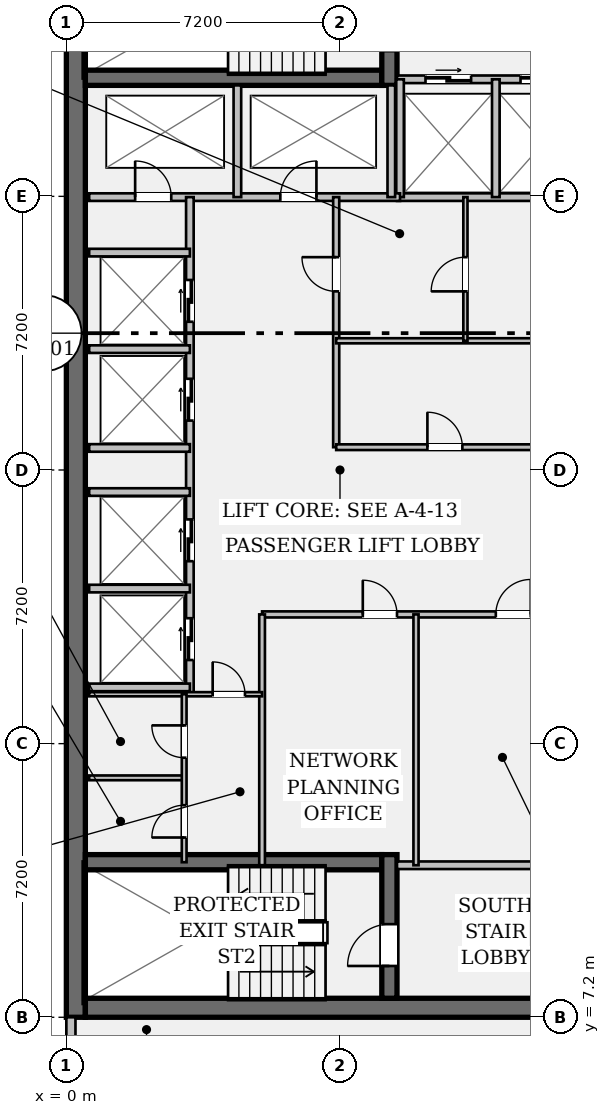
"""IFC4 building model, lengths in metres.
Left out: names, types, materials, properties, quantities, classifications, styles, units other than length and angle.
Written with IfcOpenShell. Run it as: python <this file> out.ifc"""

import sys

from ifc_helpers import new_model, si_unit, direction, frame, frame_2d, origin, place, context, subcontext, project, spatial, rectangle, extrude, element, fill, save


model = new_model("IFC4")
c1 = context("Model", 3, precision=1e-05, world=origin(), true_north=direction((0.0, 1.0)))
c2 = subcontext(c1, "Body", "Model", "MODEL_VIEW")
j1 = project(units=[si_unit("LENGTHUNIT", "METRE"), si_unit("PLANEANGLEUNIT", "RADIAN")], contexts=[c1])
p1 = place(None, origin())
s1 = spatial("IfcSite", under=j1, at=p1, CompositionType="ELEMENT")
p2 = place(p1, origin())
s2 = spatial("IfcBuilding", under=s1, at=p2, CompositionType="ELEMENT")
p3 = place(p2, frame((0.0, 0.0, 258.65)))
s3 = spatial("IfcBuildingStorey", under=s2, at=p3, CompositionType="ELEMENT", Elevation=258.65)
p4 = place(p3, frame((0.25, 7.2, 0.0), z_axis=(0.0, 0.0, 1.0), x_axis=(0.0, 1.0, 0.0)))
e1 = element("IfcWall", 1, at=p4, inside=s3, PredefinedType="SHEAR", context=c2, shape_type="SweptSolid", body=[
    extrude(rectangle(XDim=28.8, YDim=0.5, at=frame_2d((14.4, 0.0))), origin(), (0.0, 0.0, 1.0), 3.24),
])
p5 = place(p3, frame((0.5, 7.45, 0.0), z_axis=(0.0, 0.0, 1.0), x_axis=(1.0, 0.0, 0.0)))
e2 = element("IfcWall", 2, at=p5, inside=s3, PredefinedType="SHEAR", context=c2, shape_type="SweptSolid", body=[
    extrude(rectangle(XDim=13.9, YDim=0.5, at=frame_2d((6.95, 0.0))), origin(), (0.0, 0.0, 1.0), 3.24),
])
for number, where, z_axis, x_axis in (
    (3, (0.5, 31.92, 0.0), (0.0, 0.0, 1.0), (1.0, 0.0, 0.0)),
    (4, (0.5, 11.28, 0.0), (0.0, 0.0, 1.0), (1.0, 0.0, 0.0)),
):
    element("IfcWall", number, at=place(p3, frame(where, z_axis=z_axis, x_axis=x_axis)), inside=s3, PredefinedType="SHEAR", context=c2, shape_type="SweptSolid", body=[
        extrude(rectangle(XDim=7.8, YDim=0.4, at=frame_2d((3.9, 0.0))), origin(), (0.0, 0.0, 1.0), 3.24),
    ])
p6 = place(p3, frame((8.5, 31.72, 0.0), z_axis=(0.0, 0.0, 1.0), x_axis=(0.0, 1.0, 0.0)))
e5 = element("IfcWall", 5, at=p6, inside=s3, PredefinedType="SHEAR", context=c2, shape_type="SweptSolid", body=[
    extrude(rectangle(XDim=3.78, YDim=0.4, at=frame_2d((1.89, 0.0))), origin(), (0.0, 0.0, 1.0), 3.24),
])
p7 = place(p6, frame((0.9, 0.0, 0.0)))
e6 = element("IfcOpeningElement", 6, at=p7, cuts=e5, PredefinedType="OPENING", context=c2, shape_type="SweptSolid", body=[
    extrude(rectangle(XDim=1.1, YDim=2.15, at=frame_2d((0.55, 1.075))), frame((0.0, 0.212, 0.0), z_axis=(0.0, -1.0, 0.0), x_axis=(1.0, 0.0, 0.0)), (0.0, 0.0, 1.0), 0.424),
])
p8 = place(p3, frame((8.5, 7.7, 0.0), z_axis=(0.0, 0.0, 1.0), x_axis=(0.0, 1.0, 0.0)))
e7 = element("IfcWall", 7, at=p8, inside=s3, PredefinedType="SHEAR", context=c2, shape_type="SweptSolid", body=[
    extrude(rectangle(XDim=3.78, YDim=0.4, at=frame_2d((1.89, 0.0))), origin(), (0.0, 0.0, 1.0), 3.24),
])
p9 = place(p8, frame((0.85, 0.0, 0.0)))
e8 = element("IfcOpeningElement", 8, at=p9, cuts=e7, PredefinedType="OPENING", context=c2, shape_type="SweptSolid", body=[
    extrude(rectangle(XDim=1.1, YDim=2.15, at=frame_2d((0.55, 1.075))), frame((0.0, 0.212, 0.0), z_axis=(0.0, -1.0, 0.0), x_axis=(1.0, 0.0, 0.0)), (0.0, 0.0, 1.0), 0.424),
])
p10 = place(p3, frame((0.12, 6.52, 0.0), z_axis=(0.0, 0.0, 1.0), x_axis=(0.0, 1.0, 0.0)))
e9 = element("IfcWall", 9, at=p10, inside=s3, PredefinedType="STANDARD", context=c2, shape_type="SweptSolid", body=[
    extrude(rectangle(XDim=0.68, YDim=0.24, at=frame_2d((0.34, 0.0))), origin(), (0.0, 0.0, 1.0), 3.24),
])
p11 = place(p3, frame((8.7, 31.88, 0.0), z_axis=(0.0, 0.0, 1.0), x_axis=(1.0, 0.0, 0.0)))
e10 = element("IfcWall", 10, at=p11, inside=s3, PredefinedType="PARTITIONING", context=c2, shape_type="SweptSolid", body=[
    extrude(rectangle(XDim=5.15, YDim=0.2, at=frame_2d((2.575, 0.0))), origin(), (0.0, 0.0, 1.0), 3.24),
])
p12 = place(p11, frame((0.75, 0.0, 0.0)))
e11 = element("IfcOpeningElement", 11, at=p12, cuts=e10, PredefinedType="OPENING", context=c2, shape_type="SweptSolid", body=[
    extrude(rectangle(XDim=1.2, YDim=2.2, at=frame_2d((0.6, 1.1))), frame((0.0, 0.112, 0.0), z_axis=(0.0, -1.0, 0.0), x_axis=(1.0, 0.0, 0.0)), (0.0, 0.0, 1.0), 0.224),
])
p13 = place(p11, frame((3.25, 0.0, 0.0)))
e12 = element("IfcOpeningElement", 12, at=p13, cuts=e10, PredefinedType="OPENING", context=c2, shape_type="SweptSolid", body=[
    extrude(rectangle(XDim=1.2, YDim=2.2, at=frame_2d((0.6, 1.1))), frame((0.0, 0.112, 0.0), z_axis=(0.0, -1.0, 0.0), x_axis=(1.0, 0.0, 0.0)), (0.0, 0.0, 1.0), 0.224),
])
for number, where, z_axis, x_axis in (
    (13, (8.7, 11.2, 0.0), (0.0, 0.0, 1.0), (1.0, 0.0, 0.0)),
    (14, (8.7, 28.78, 0.0), (0.0, 0.0, 1.0), (1.0, 0.0, 0.0)),
):
    element("IfcWall", number, at=place(p3, frame(where, z_axis=z_axis, x_axis=x_axis)), inside=s3, PredefinedType="PARTITIONING", context=c2, shape_type="SweptSolid", body=[
        extrude(rectangle(XDim=5.15, YDim=0.2, at=frame_2d((2.575, 0.0))), origin(), (0.0, 0.0, 1.0), 3.24),
    ])
for number, where, z_axis, x_axis in (
    (15, (8.78, 28.78, 0.0), (0.0, 0.0, 1.0), (0.0, 1.0, 0.0)),
    (16, (11.3, 28.78, 0.0), (0.0, 0.0, 1.0), (0.0, 1.0, 0.0)),
):
    element("IfcWall", number, at=place(p3, frame(where, z_axis=z_axis, x_axis=x_axis)), inside=s3, PredefinedType="PARTITIONING", context=c2, shape_type="SweptSolid", body=[
        extrude(rectangle(XDim=3.1, YDim=0.2, at=frame_2d((1.55, 0.0))), origin(), (0.0, 0.0, 1.0), 3.24),
    ])
p14 = place(p3, frame((0.6, 28.78, 0.0), z_axis=(0.0, 0.0, 1.0), x_axis=(1.0, 0.0, 0.0)))
e17 = element("IfcWall", 17, at=p14, inside=s3, PredefinedType="PARTITIONING", context=c2, shape_type="SweptSolid", body=[
    extrude(rectangle(XDim=8.18, YDim=0.2, at=frame_2d((4.09, 0.0))), origin(), (0.0, 0.0, 1.0), 3.24),
])
p15 = place(p14, frame((1.21, 0.0, 0.0)))
e18 = element("IfcOpeningElement", 18, at=p15, cuts=e17, PredefinedType="OPENING", context=c2, shape_type="SweptSolid", body=[
    extrude(rectangle(XDim=0.95, YDim=2.15, at=frame_2d((0.475, 1.075))), frame((0.0, 0.112, 0.0), z_axis=(0.0, -1.0, 0.0), x_axis=(1.0, 0.0, 0.0)), (0.0, 0.0, 1.0), 0.224),
])
p16 = place(p14, frame((5.03, 0.0, 0.0)))
e19 = element("IfcOpeningElement", 19, at=p16, cuts=e17, PredefinedType="OPENING", context=c2, shape_type="SweptSolid", body=[
    extrude(rectangle(XDim=0.95, YDim=2.15, at=frame_2d((0.475, 1.075))), frame((0.0, 0.112, 0.0), z_axis=(0.0, -1.0, 0.0), x_axis=(1.0, 0.0, 0.0)), (0.0, 0.0, 1.0), 0.224),
])
for number, where, z_axis, x_axis in (
    (20, (4.5, 28.78, 0.0), (0.0, 0.0, 1.0), (0.0, 1.0, 0.0)),
    (21, (8.55, 28.78, 0.0), (0.0, 0.0, 1.0), (0.0, 1.0, 0.0)),
):
    element("IfcWall", number, at=place(p3, frame(where, z_axis=z_axis, x_axis=x_axis)), inside=s3, PredefinedType="PARTITIONING", context=c2, shape_type="SweptSolid", body=[
        extrude(rectangle(XDim=2.94, YDim=0.2, at=frame_2d((1.47, 0.0))), origin(), (0.0, 0.0, 1.0), 3.24),
    ])
p17 = place(p3, frame((3.25, 15.7, 0.0), z_axis=(0.0, 0.0, 1.0), x_axis=(0.0, 1.0, 0.0)))
e22 = element("IfcWall", 22, at=p17, inside=s3, PredefinedType="PARTITIONING", context=c2, shape_type="SweptSolid", body=[
    extrude(rectangle(XDim=13.08, YDim=0.2, at=frame_2d((6.54, 0.0))), origin(), (0.0, 0.0, 1.0), 3.24),
])
p18 = place(p17, frame((0.9, 0.0, 0.0)))
e23 = element("IfcOpeningElement", 23, at=p18, cuts=e22, PredefinedType="OPENING", context=c2, shape_type="SweptSolid", body=[
    extrude(rectangle(XDim=1.1, YDim=2.2, at=frame_2d((0.55, 1.1))), frame((0.0, 0.112, 0.0), z_axis=(0.0, -1.0, 0.0), x_axis=(1.0, 0.0, 0.0)), (0.0, 0.0, 1.0), 0.224),
])
p19 = place(p17, frame((3.5, 0.0, 0.0)))
e24 = element("IfcOpeningElement", 24, at=p19, cuts=e22, PredefinedType="OPENING", context=c2, shape_type="SweptSolid", body=[
    extrude(rectangle(XDim=1.1, YDim=2.2, at=frame_2d((0.55, 1.1))), frame((0.0, 0.112, 0.0), z_axis=(0.0, -1.0, 0.0), x_axis=(1.0, 0.0, 0.0)), (0.0, 0.0, 1.0), 0.224),
])
p20 = place(p17, frame((7.2, 0.0, 0.0)))
e25 = element("IfcOpeningElement", 25, at=p20, cuts=e22, PredefinedType="OPENING", context=c2, shape_type="SweptSolid", body=[
    extrude(rectangle(XDim=1.1, YDim=2.2, at=frame_2d((0.55, 1.1))), frame((0.0, 0.112, 0.0), z_axis=(0.0, -1.0, 0.0), x_axis=(1.0, 0.0, 0.0)), (0.0, 0.0, 1.0), 0.224),
])
p21 = place(p17, frame((9.8, 0.0, 0.0)))
e26 = element("IfcOpeningElement", 26, at=p21, cuts=e22, PredefinedType="OPENING", context=c2, shape_type="SweptSolid", body=[
    extrude(rectangle(XDim=1.1, YDim=2.2, at=frame_2d((0.55, 1.1))), frame((0.0, 0.112, 0.0), z_axis=(0.0, -1.0, 0.0), x_axis=(1.0, 0.0, 0.0)), (0.0, 0.0, 1.0), 0.224),
])
for number, where, z_axis, x_axis in (
    (27, (0.6, 15.88, 0.0), (0.0, 0.0, 1.0), (1.0, 0.0, 0.0)),
    (28, (0.6, 18.48, 0.0), (0.0, 0.0, 1.0), (1.0, 0.0, 0.0)),
    (29, (0.6, 22.18, 0.0), (0.0, 0.0, 1.0), (1.0, 0.0, 0.0)),
    (30, (0.6, 24.78, 0.0), (0.0, 0.0, 1.0), (1.0, 0.0, 0.0)),
    (31, (0.6, 21.02, 0.0), (0.0, 0.0, 1.0), (1.0, 0.0, 0.0)),
    (32, (0.6, 27.32, 0.0), (0.0, 0.0, 1.0), (1.0, 0.0, 0.0)),
):
    element("IfcWall", number, at=place(p3, frame(where, z_axis=z_axis, x_axis=x_axis)), inside=s3, PredefinedType="PARTITIONING", context=c2, shape_type="SweptSolid", body=[
        extrude(rectangle(XDim=2.65, YDim=0.2, at=frame_2d((1.325, 0.0))), origin(), (0.0, 0.0, 1.0), 3.24),
    ])
p22 = place(p3, frame((7.1, 22.2, 0.0), z_axis=(0.0, 0.0, 1.0), x_axis=(0.0, 1.0, 0.0)))
e33 = element("IfcWall", 33, at=p22, inside=s3, PredefinedType="PARTITIONING", context=c2, shape_type="SweptSolid", body=[
    extrude(rectangle(XDim=6.58, YDim=0.16, at=frame_2d((3.29, 0.0))), origin(), (0.0, 0.0, 1.0), 3.24),
])
p23 = place(p22, frame((4.1, 0.0, 0.0)))
e34 = element("IfcOpeningElement", 34, at=p23, cuts=e33, PredefinedType="OPENING", context=c2, shape_type="SweptSolid", body=[
    extrude(rectangle(XDim=0.9, YDim=2.15, at=frame_2d((0.45, 1.075))), frame((0.0, 0.092, 0.0), z_axis=(0.0, -1.0, 0.0), x_axis=(1.0, 0.0, 0.0)), (0.0, 0.0, 1.0), 0.184),
])
p24 = place(p3, frame((7.1, 22.2, 0.0), z_axis=(0.0, 0.0, 1.0), x_axis=(1.0, 0.0, 0.0)))
e35 = element("IfcWall", 35, at=p24, inside=s3, PredefinedType="PARTITIONING", context=c2, shape_type="SweptSolid", body=[
    extrude(rectangle(XDim=7.05, YDim=0.15, at=frame_2d((3.525, 0.0))), origin(), (0.0, 0.0, 1.0), 3.24),
])
p25 = place(p24, frame((2.4, 0.0, 0.0)))
e36 = element("IfcOpeningElement", 36, at=p25, cuts=e35, PredefinedType="OPENING", context=c2, shape_type="SweptSolid", body=[
    extrude(rectangle(XDim=0.92, YDim=2.15, at=frame_2d((0.46, 1.075))), frame((0.0, 0.087, 0.0), z_axis=(0.0, -1.0, 0.0), x_axis=(1.0, 0.0, 0.0)), (0.0, 0.0, 1.0), 0.174),
])
p26 = place(p3, frame((7.1, 25.0, 0.0), z_axis=(0.0, 0.0, 1.0), x_axis=(1.0, 0.0, 0.0)))
e37 = element("IfcWall", 37, at=p26, inside=s3, PredefinedType="PARTITIONING", context=c2, shape_type="SweptSolid", body=[
    extrude(rectangle(XDim=7.05, YDim=0.135, at=frame_2d((3.525, 0.0))), origin(), (0.0, 0.0, 1.0), 3.24),
])
p27 = place(p3, frame((10.5, 25.0, 0.0), z_axis=(0.0, 0.0, 1.0), x_axis=(0.0, 1.0, 0.0)))
e38 = element("IfcWall", 38, at=p27, inside=s3, PredefinedType="PARTITIONING", context=c2, shape_type="SweptSolid", body=[
    extrude(rectangle(XDim=3.78, YDim=0.11, at=frame_2d((1.89, 0.0))), origin(), (0.0, 0.0, 1.0), 3.24),
])
p28 = place(p27, frame((1.3, 0.0, 0.0)))
e39 = element("IfcOpeningElement", 39, at=p28, cuts=e38, PredefinedType="OPENING", context=c2, shape_type="SweptSolid", body=[
    extrude(rectangle(XDim=0.9, YDim=2.15, at=frame_2d((0.45, 1.075))), frame((0.0, 0.067, 0.0), z_axis=(0.0, -1.0, 0.0), x_axis=(1.0, 0.0, 0.0)), (0.0, 0.0, 1.0), 0.134),
])
p29 = place(p3, frame((5.15, 17.8, 0.0), z_axis=(0.0, 0.0, 1.0), x_axis=(1.0, 0.0, 0.0)))
e40 = element("IfcWall", 40, at=p29, inside=s3, PredefinedType="PARTITIONING", context=c2, shape_type="SweptSolid", body=[
    extrude(rectangle(XDim=9.0, YDim=0.16, at=frame_2d((4.5, 0.0))), origin(), (0.0, 0.0, 1.0), 3.24),
])
p30 = place(p29, frame((2.65, 0.0, 0.0)))
e41 = element("IfcOpeningElement", 41, at=p30, cuts=e40, PredefinedType="OPENING", context=c2, shape_type="SweptSolid", body=[
    extrude(rectangle(XDim=0.9, YDim=2.15, at=frame_2d((0.45, 1.075))), frame((0.0, 0.092, 0.0), z_axis=(0.0, -1.0, 0.0), x_axis=(1.0, 0.0, 0.0)), (0.0, 0.0, 1.0), 0.184),
])
p31 = place(p29, frame((6.15, 0.0, 0.0)))
e42 = element("IfcOpeningElement", 42, at=p31, cuts=e40, PredefinedType="OPENING", context=c2, shape_type="SweptSolid", body=[
    extrude(rectangle(XDim=0.92, YDim=2.15, at=frame_2d((0.46, 1.075))), frame((0.0, 0.092, 0.0), z_axis=(0.0, -1.0, 0.0), x_axis=(1.0, 0.0, 0.0)), (0.0, 0.0, 1.0), 0.184),
])
p32 = place(p3, frame((5.15, 11.2, 0.0), z_axis=(0.0, 0.0, 1.0), x_axis=(0.0, 1.0, 0.0)))
e43 = element("IfcWall", 43, at=p32, inside=s3, PredefinedType="PARTITIONING", context=c2, shape_type="SweptSolid", body=[
    extrude(rectangle(XDim=6.6, YDim=0.15, at=frame_2d((3.3, 0.0))), origin(), (0.0, 0.0, 1.0), 3.24),
])
p33 = place(p3, frame((9.2, 11.2, 0.0), z_axis=(0.0, 0.0, 1.0), x_axis=(0.0, 1.0, 0.0)))
e44 = element("IfcWall", 44, at=p33, inside=s3, PredefinedType="PARTITIONING", context=c2, shape_type="SweptSolid", body=[
    extrude(rectangle(XDim=6.6, YDim=0.135, at=frame_2d((3.3, 0.0))), origin(), (0.0, 0.0, 1.0), 3.24),
])
p34 = place(p3, frame((0.6, 15.7, 0.0), z_axis=(0.0, 0.0, 1.0), x_axis=(1.0, 0.0, 0.0)))
e45 = element("IfcWall", 45, at=p34, inside=s3, PredefinedType="PARTITIONING", context=c2, shape_type="SweptSolid", body=[
    extrude(rectangle(XDim=4.55, YDim=0.11, at=frame_2d((2.275, 0.0))), origin(), (0.0, 0.0, 1.0), 3.24),
])
p35 = place(p34, frame((3.25, 0.0, 0.0)))
e46 = element("IfcOpeningElement", 46, at=p35, cuts=e45, PredefinedType="OPENING", context=c2, shape_type="SweptSolid", body=[
    extrude(rectangle(XDim=0.85, YDim=2.15, at=frame_2d((0.425, 1.075))), frame((0.0, 0.067, 0.0), z_axis=(0.0, -1.0, 0.0), x_axis=(1.0, 0.0, 0.0)), (0.0, 0.0, 1.0), 0.134),
])
p36 = place(p3, frame((0.6, 13.5, 0.0), z_axis=(0.0, 0.0, 1.0), x_axis=(1.0, 0.0, 0.0)))
e47 = element("IfcWall", 47, at=p36, inside=s3, PredefinedType="PARTITIONING", context=c2, shape_type="SweptSolid", body=[
    extrude(rectangle(XDim=2.5, YDim=0.125, at=frame_2d((1.25, 0.0))), origin(), (0.0, 0.0, 1.0), 3.24),
])
p37 = place(p3, frame((3.1, 11.28, 0.0), z_axis=(0.0, 0.0, 1.0), x_axis=(0.0, 1.0, 0.0)))
e48 = element("IfcWall", 48, at=p37, inside=s3, PredefinedType="PARTITIONING", context=c2, shape_type="SweptSolid", body=[
    extrude(rectangle(XDim=4.42, YDim=0.125, at=frame_2d((2.21, 0.0))), origin(), (0.0, 0.0, 1.0), 3.24),
])
p38 = place(p37, frame((0.65, 0.0, 0.0)))
e49 = element("IfcOpeningElement", 49, at=p38, cuts=e48, PredefinedType="OPENING", context=c2, shape_type="SweptSolid", body=[
    extrude(rectangle(XDim=0.85, YDim=2.15, at=frame_2d((0.425, 1.075))), frame((0.0, 0.074, 0.0), z_axis=(0.0, -1.0, 0.0), x_axis=(1.0, 0.0, 0.0)), (0.0, 0.0, 1.0), 0.149),
])
p39 = place(p37, frame((2.75, 0.0, 0.0)))
e50 = element("IfcOpeningElement", 50, at=p39, cuts=e48, PredefinedType="OPENING", context=c2, shape_type="SweptSolid", body=[
    extrude(rectangle(XDim=0.85, YDim=2.15, at=frame_2d((0.425, 1.075))), frame((0.0, 0.074, 0.0), z_axis=(0.0, -1.0, 0.0), x_axis=(1.0, 0.0, 0.0)), (0.0, 0.0, 1.0), 0.149),
])
p40 = place(p9, origin())
e51 = element("IfcDoor", 51, at=p40, inside=s3, OperationType="SINGLE_SWING_LEFT", PredefinedType="DOOR", context=c2, shape_type="SweptSolid", body=[
    extrude(rectangle(XDim=1.1, YDim=2.15, at=frame_2d((0.55, 1.075))), frame((0.0, 0.025, 0.0), z_axis=(0.0, -1.0, 0.0), x_axis=(1.0, 0.0, 0.0)), (0.0, 0.0, 1.0), 0.05),
])
fill(e8, e51)
p41 = place(p12, origin())
e52 = element("IfcDoor", 52, at=p41, inside=s3, OperationType="DOUBLE_DOOR_SLIDING", PredefinedType="DOOR", context=c2, shape_type="SweptSolid", body=[
    extrude(rectangle(XDim=1.2, YDim=2.2, at=frame_2d((0.6, 1.1))), frame((0.0, 0.025, 0.0), z_axis=(0.0, -1.0, 0.0), x_axis=(1.0, 0.0, 0.0)), (0.0, 0.0, 1.0), 0.05),
])
fill(e11, e52)
p42 = place(p13, origin())
e53 = element("IfcDoor", 53, at=p42, inside=s3, OperationType="DOUBLE_DOOR_SLIDING", PredefinedType="DOOR", context=c2, shape_type="SweptSolid", body=[
    extrude(rectangle(XDim=1.2, YDim=2.2, at=frame_2d((0.6, 1.1))), frame((0.0, 0.025, 0.0), z_axis=(0.0, -1.0, 0.0), x_axis=(1.0, 0.0, 0.0)), (0.0, 0.0, 1.0), 0.05),
])
fill(e12, e53)
p43 = place(p15, origin())
e54 = element("IfcDoor", 54, at=p43, inside=s3, OperationType="SINGLE_SWING_LEFT", PredefinedType="DOOR", context=c2, shape_type="SweptSolid", body=[
    extrude(rectangle(XDim=0.95, YDim=2.15, at=frame_2d((0.475, 1.075))), frame((0.0, 0.025, 0.0), z_axis=(0.0, -1.0, 0.0), x_axis=(1.0, 0.0, 0.0)), (0.0, 0.0, 1.0), 0.05),
])
fill(e18, e54)
p44 = place(p16, origin())
e55 = element("IfcDoor", 55, at=p44, inside=s3, OperationType="SINGLE_SWING_RIGHT", PredefinedType="DOOR", context=c2, shape_type="SweptSolid", body=[
    extrude(rectangle(XDim=0.95, YDim=2.15, at=frame_2d((0.475, 1.075))), frame((0.0, 0.025, 0.0), z_axis=(0.0, -1.0, 0.0), x_axis=(1.0, 0.0, 0.0)), (0.0, 0.0, 1.0), 0.05),
])
fill(e19, e55)
p45 = place(p18, origin())
e56 = element("IfcDoor", 56, at=p45, inside=s3, OperationType="DOUBLE_DOOR_SLIDING", PredefinedType="DOOR", context=c2, shape_type="SweptSolid", body=[
    extrude(rectangle(XDim=1.1, YDim=2.2, at=frame_2d((0.55, 1.1))), frame((0.0, 0.025, 0.0), z_axis=(0.0, -1.0, 0.0), x_axis=(1.0, 0.0, 0.0)), (0.0, 0.0, 1.0), 0.05),
])
fill(e23, e56)
p46 = place(p19, origin())
e57 = element("IfcDoor", 57, at=p46, inside=s3, OperationType="DOUBLE_DOOR_SLIDING", PredefinedType="DOOR", context=c2, shape_type="SweptSolid", body=[
    extrude(rectangle(XDim=1.1, YDim=2.2, at=frame_2d((0.55, 1.1))), frame((0.0, 0.025, 0.0), z_axis=(0.0, -1.0, 0.0), x_axis=(1.0, 0.0, 0.0)), (0.0, 0.0, 1.0), 0.05),
])
fill(e24, e57)
p47 = place(p20, origin())
e58 = element("IfcDoor", 58, at=p47, inside=s3, OperationType="DOUBLE_DOOR_SLIDING", PredefinedType="DOOR", context=c2, shape_type="SweptSolid", body=[
    extrude(rectangle(XDim=1.1, YDim=2.2, at=frame_2d((0.55, 1.1))), frame((0.0, 0.025, 0.0), z_axis=(0.0, -1.0, 0.0), x_axis=(1.0, 0.0, 0.0)), (0.0, 0.0, 1.0), 0.05),
])
fill(e25, e58)
p48 = place(p21, origin())
e59 = element("IfcDoor", 59, at=p48, inside=s3, OperationType="DOUBLE_DOOR_SLIDING", PredefinedType="DOOR", context=c2, shape_type="SweptSolid", body=[
    extrude(rectangle(XDim=1.1, YDim=2.2, at=frame_2d((0.55, 1.1))), frame((0.0, 0.025, 0.0), z_axis=(0.0, -1.0, 0.0), x_axis=(1.0, 0.0, 0.0)), (0.0, 0.0, 1.0), 0.05),
])
fill(e26, e59)
p49 = place(p25, origin())
e60 = element("IfcDoor", 60, at=p49, inside=s3, OperationType="SINGLE_SWING_LEFT", PredefinedType="DOOR", context=c2, shape_type="SweptSolid", body=[
    extrude(rectangle(XDim=0.92, YDim=2.15, at=frame_2d((0.46, 1.075))), frame((0.0, 0.025, 0.0), z_axis=(0.0, -1.0, 0.0), x_axis=(1.0, 0.0, 0.0)), (0.0, 0.0, 1.0), 0.05),
])
fill(e36, e60)
p50 = place(p23, origin())
e61 = element("IfcDoor", 61, at=p50, inside=s3, OperationType="SINGLE_SWING_RIGHT", PredefinedType="DOOR", context=c2, shape_type="SweptSolid", body=[
    extrude(rectangle(XDim=0.9, YDim=2.15, at=frame_2d((0.45, 1.075))), frame((0.0, 0.025, 0.0), z_axis=(0.0, -1.0, 0.0), x_axis=(1.0, 0.0, 0.0)), (0.0, 0.0, 1.0), 0.05),
])
fill(e34, e61)
p51 = place(p28, origin())
e62 = element("IfcDoor", 62, at=p51, inside=s3, OperationType="SINGLE_SWING_LEFT", PredefinedType="DOOR", context=c2, shape_type="SweptSolid", body=[
    extrude(rectangle(XDim=0.9, YDim=2.15, at=frame_2d((0.45, 1.075))), frame((0.0, 0.025, 0.0), z_axis=(0.0, -1.0, 0.0), x_axis=(1.0, 0.0, 0.0)), (0.0, 0.0, 1.0), 0.05),
])
fill(e39, e62)
p52 = place(p30, origin())
e63 = element("IfcDoor", 63, at=p52, inside=s3, OperationType="SINGLE_SWING_LEFT", PredefinedType="DOOR", context=c2, shape_type="SweptSolid", body=[
    extrude(rectangle(XDim=0.9, YDim=2.15, at=frame_2d((0.45, 1.075))), frame((0.0, 0.025, 0.0), z_axis=(0.0, -1.0, 0.0), x_axis=(1.0, 0.0, 0.0)), (0.0, 0.0, 1.0), 0.05),
])
fill(e41, e63)
p53 = place(p31, origin())
e64 = element("IfcDoor", 64, at=p53, inside=s3, OperationType="SINGLE_SWING_RIGHT", PredefinedType="DOOR", context=c2, shape_type="SweptSolid", body=[
    extrude(rectangle(XDim=0.92, YDim=2.15, at=frame_2d((0.46, 1.075))), frame((0.0, 0.025, 0.0), z_axis=(0.0, -1.0, 0.0), x_axis=(1.0, 0.0, 0.0)), (0.0, 0.0, 1.0), 0.05),
])
fill(e42, e64)
p54 = place(p35, origin())
e65 = element("IfcDoor", 65, at=p54, inside=s3, OperationType="SINGLE_SWING_LEFT", PredefinedType="DOOR", context=c2, shape_type="SweptSolid", body=[
    extrude(rectangle(XDim=0.85, YDim=2.15, at=frame_2d((0.425, 1.075))), frame((0.0, 0.025, 0.0), z_axis=(0.0, -1.0, 0.0), x_axis=(1.0, 0.0, 0.0)), (0.0, 0.0, 1.0), 0.05),
])
fill(e46, e65)
p55 = place(p38, origin())
e66 = element("IfcDoor", 66, at=p55, inside=s3, OperationType="SINGLE_SWING_LEFT", PredefinedType="DOOR", context=c2, shape_type="SweptSolid", body=[
    extrude(rectangle(XDim=0.85, YDim=2.15, at=frame_2d((0.425, 1.075))), frame((0.0, 0.025, 0.0), z_axis=(0.0, -1.0, 0.0), x_axis=(1.0, 0.0, 0.0)), (0.0, 0.0, 1.0), 0.05),
])
fill(e49, e66)
p56 = place(p39, origin())
e67 = element("IfcDoor", 67, at=p56, inside=s3, OperationType="SINGLE_SWING_RIGHT", PredefinedType="DOOR", context=c2, shape_type="SweptSolid", body=[
    extrude(rectangle(XDim=0.85, YDim=2.15, at=frame_2d((0.425, 1.075))), frame((0.0, 0.025, 0.0), z_axis=(0.0, -1.0, 0.0), x_axis=(1.0, 0.0, 0.0)), (0.0, 0.0, 1.0), 0.05),
])
fill(e50, e67)
save(model, sys.argv[1])
